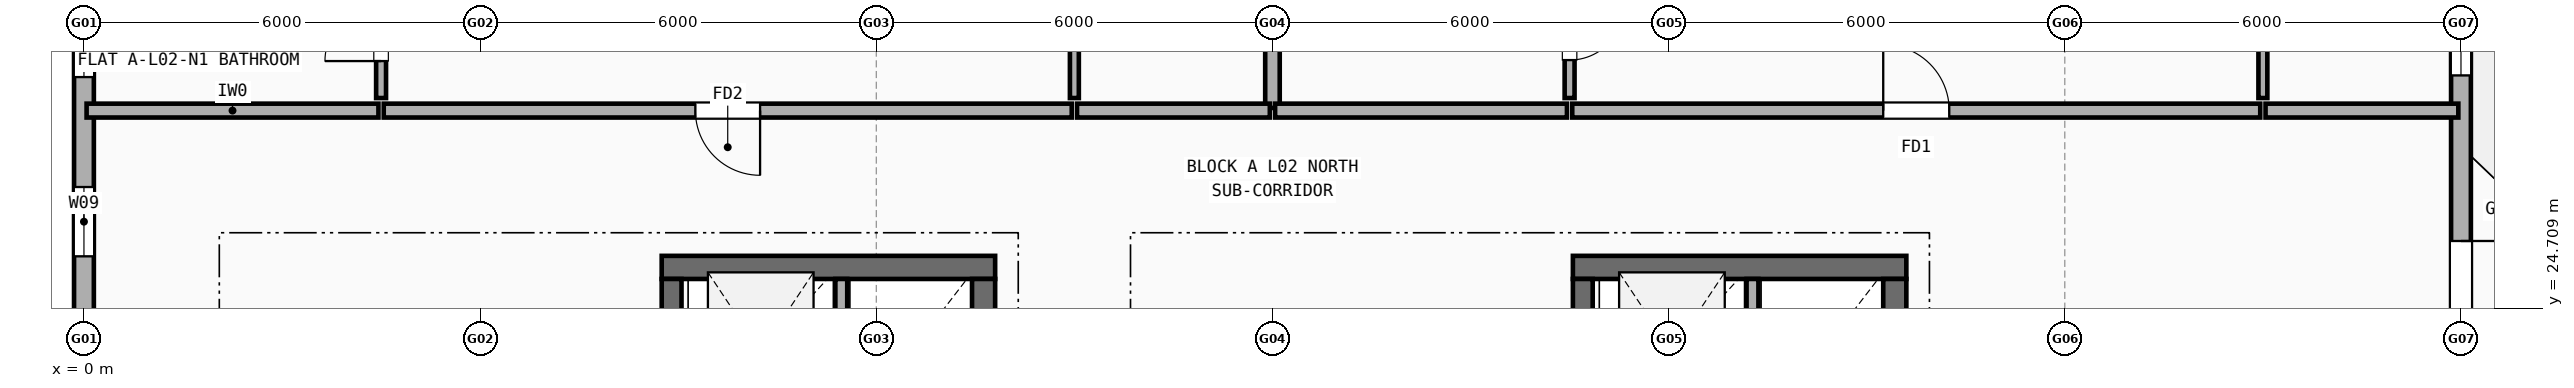
"""IFC4 building model, lengths in metres.
Left out: names, types, materials, properties, quantities, classifications, styles, units other than length and angle.
Written with IfcOpenShell. Run it as: python <this file> out.ifc"""

import sys

from ifc_helpers import new_model, si_unit, direction, frame, frame_2d, origin, place, context, subcontext, project, spatial, rectangle, extrude, element, fill, save


model = new_model("IFC4")
c1 = context("Model", 3, precision=1e-05, world=origin(), true_north=direction((0.0, 1.0)))
c2 = subcontext(c1, "Body", "Model", "MODEL_VIEW")
j1 = project(units=[si_unit("LENGTHUNIT", "METRE"), si_unit("PLANEANGLEUNIT", "RADIAN")], contexts=[c1])
p1 = place(None, origin())
s1 = spatial("IfcSite", under=j1, at=p1, CompositionType="ELEMENT")
p2 = place(p1, origin())
s2 = spatial("IfcBuilding", under=s1, at=p2, CompositionType="ELEMENT")
p3 = place(p2, frame((0.0, 0.0, 7.7)))
s3 = spatial("IfcBuildingStorey", under=s2, at=p3, CompositionType="ELEMENT", Elevation=7.7)
p4 = place(p3, frame((36.0, 24.375, 0.0), z_axis=(0.0, 0.0, 1.0), x_axis=(0.0, 1.0, 0.0)))
e1 = element("IfcWall", 1, at=p4, inside=s3, PredefinedType="STANDARD", context=c2, shape_type="SweptSolid", body=[
    extrude(rectangle(XDim=5.25, YDim=0.3, at=frame_2d((2.625, 0.0))), origin(), (0.0, 0.0, 1.0), 2.437),
])
p5 = place(p4, frame((0.2, 0.0, 0.0)))
e2 = element("IfcOpeningElement", 2, at=p5, cuts=e1, PredefinedType="OPENING", context=c2, shape_type="SweptSolid", body=[
    extrude(rectangle(XDim=1.15, YDim=2.15, at=frame_2d((0.575, 1.075))), frame((0.0, 0.16, 0.0), z_axis=(0.0, -1.0, 0.0), x_axis=(1.0, 0.0, 0.0)), (0.0, 0.0, 1.0), 0.32),
])
p6 = place(p4, frame((3.857, 0.0, 0.9)))
e3 = element("IfcOpeningElement", 3, at=p6, cuts=e1, PredefinedType="OPENING", context=c2, shape_type="SweptSolid", body=[
    extrude(rectangle(XDim=0.9, YDim=1.3, at=frame_2d((0.45, 0.65))), frame((0.0, 0.16, 0.0), z_axis=(0.0, -1.0, 0.0), x_axis=(1.0, 0.0, 0.0)), (0.0, 0.0, 1.0), 0.32),
])
p7 = place(p3, frame((0.0, 29.625, 0.0), z_axis=(0.0, 0.0, 1.0), x_axis=(0.0, -1.0, 0.0)))
e4 = element("IfcWall", 4, at=p7, inside=s3, PredefinedType="STANDARD", context=c2, shape_type="SweptSolid", body=[
    extrude(rectangle(XDim=5.25, YDim=0.3, at=frame_2d((2.625, 0.0))), origin(), (0.0, 0.0, 1.0), 2.437),
])
p8 = place(p7, frame((0.468, 0.0, 0.9)))
e5 = element("IfcOpeningElement", 5, at=p8, cuts=e4, PredefinedType="OPENING", context=c2, shape_type="SweptSolid", body=[
    extrude(rectangle(XDim=0.95, YDim=1.35, at=frame_2d((0.475, 0.675))), frame((0.0, 0.16, 0.0), z_axis=(0.0, -1.0, 0.0), x_axis=(1.0, 0.0, 0.0)), (0.0, 0.0, 1.0), 0.32),
])
p9 = place(p7, frame((3.083, 0.0, 0.9)))
e6 = element("IfcOpeningElement", 6, at=p9, cuts=e4, PredefinedType="OPENING", context=c2, shape_type="SweptSolid", body=[
    extrude(rectangle(XDim=1.05, YDim=1.35, at=frame_2d((0.525, 0.675))), frame((0.0, 0.16, 0.0), z_axis=(0.0, -1.0, 0.0), x_axis=(1.0, 0.0, 0.0)), (0.0, 0.0, 1.0), 0.32),
])
p10 = place(p3, frame((13.8, 25.325, 0.0), z_axis=(0.0, 0.0, 1.0), x_axis=(-1.0, 0.0, 0.0)))
e7 = element("IfcWall", 7, at=p10, inside=s3, PredefinedType="SHEAR", context=c2, shape_type="SweptSolid", body=[
    extrude(rectangle(XDim=5.05, YDim=0.35, at=frame_2d((2.525, 0.0))), origin(), (0.0, 0.0, 1.0), 2.955),
])
p11 = place(p3, frame((13.625, 18.75, 0.0), z_axis=(0.0, 0.0, 1.0), x_axis=(0.0, 1.0, 0.0)))
e8 = element("IfcWall", 8, at=p11, inside=s3, PredefinedType="SHEAR", context=c2, shape_type="SweptSolid", body=[
    extrude(rectangle(XDim=6.4, YDim=0.35, at=frame_2d((3.2, 0.0))), origin(), (0.0, 0.0, 1.0), 2.955),
])
p12 = place(p3, frame((8.9, 21.8, 0.0), z_axis=(0.0, 0.0, 1.0), x_axis=(0.0, 1.0, 0.0)))
e9 = element("IfcWall", 9, at=p12, inside=s3, PredefinedType="SHEAR", context=c2, shape_type="SweptSolid", body=[
    extrude(rectangle(XDim=3.35, YDim=0.3, at=frame_2d((1.675, 0.0))), origin(), (0.0, 0.0, 1.0), 2.955),
])
p13 = place(p3, frame((11.47, 22.94, 0.0), z_axis=(0.0, 0.0, 1.0), x_axis=(0.0, 1.0, 0.0)))
e10 = element("IfcWall", 10, at=p13, inside=s3, PredefinedType="SOLIDWALL", context=c2, shape_type="SweptSolid", body=[
    extrude(rectangle(XDim=2.21, YDim=0.18, at=frame_2d((1.105, 0.0))), origin(), (0.0, 0.0, 1.0), 2.955),
])
p14 = place(p3, frame((27.6, 25.325, 0.0), z_axis=(0.0, 0.0, 1.0), x_axis=(-1.0, 0.0, 0.0)))
e11 = element("IfcWall", 11, at=p14, inside=s3, PredefinedType="SHEAR", context=c2, shape_type="SweptSolid", body=[
    extrude(rectangle(XDim=5.05, YDim=0.35, at=frame_2d((2.525, 0.0))), origin(), (0.0, 0.0, 1.0), 2.955),
])
p15 = place(p3, frame((27.425, 18.75, 0.0), z_axis=(0.0, 0.0, 1.0), x_axis=(0.0, 1.0, 0.0)))
e12 = element("IfcWall", 12, at=p15, inside=s3, PredefinedType="SHEAR", context=c2, shape_type="SweptSolid", body=[
    extrude(rectangle(XDim=6.4, YDim=0.35, at=frame_2d((3.2, 0.0))), origin(), (0.0, 0.0, 1.0), 2.955),
])
p16 = place(p3, frame((22.7, 21.8, 0.0), z_axis=(0.0, 0.0, 1.0), x_axis=(0.0, 1.0, 0.0)))
e13 = element("IfcWall", 13, at=p16, inside=s3, PredefinedType="SHEAR", context=c2, shape_type="SweptSolid", body=[
    extrude(rectangle(XDim=3.35, YDim=0.3, at=frame_2d((1.675, 0.0))), origin(), (0.0, 0.0, 1.0), 2.955),
])
p17 = place(p3, frame((25.27, 22.94, 0.0), z_axis=(0.0, 0.0, 1.0), x_axis=(0.0, 1.0, 0.0)))
e14 = element("IfcWall", 14, at=p17, inside=s3, PredefinedType="SOLIDWALL", context=c2, shape_type="SweptSolid", body=[
    extrude(rectangle(XDim=2.21, YDim=0.18, at=frame_2d((1.105, 0.0))), origin(), (0.0, 0.0, 1.0), 2.955),
])
p18 = place(p3, frame((18.0, 27.74, 0.0), z_axis=(0.0, 0.0, 1.0), x_axis=(0.0, 1.0, 0.0)))
e15 = element("IfcWall", 15, at=p18, inside=s3, PredefinedType="SOLIDWALL", context=c2, shape_type="SweptSolid", body=[
    extrude(rectangle(XDim=13.87, YDim=0.22, at=frame_2d((6.935, 0.0))), origin(), (0.0, 0.0, 1.0), 2.337),
])
p19 = place(p3, frame((0.04, 27.7, 0.0), z_axis=(0.0, 0.0, 1.0), x_axis=(1.0, 0.0, 0.0)))
e16 = element("IfcWall", 16, at=p19, inside=s3, PredefinedType="SOLIDWALL", context=c2, shape_type="SweptSolid", body=[
    extrude(rectangle(XDim=4.42, YDim=0.21, at=frame_2d((2.21, 0.0))), origin(), (0.0, 0.0, 1.0), 2.437),
])
p20 = place(p3, frame((4.54, 27.7, 0.0), z_axis=(0.0, 0.0, 1.0), x_axis=(1.0, 0.0, 0.0)))
e17 = element("IfcWall", 17, at=p20, inside=s3, PredefinedType="SOLIDWALL", context=c2, shape_type="SweptSolid", body=[
    extrude(rectangle(XDim=10.42, YDim=0.21, at=frame_2d((5.21, 0.0))), origin(), (0.0, 0.0, 1.0), 2.508),
])
p21 = place(p20, frame((4.72, 0.0, 0.0)))
e18 = element("IfcOpeningElement", 18, at=p21, cuts=e17, PredefinedType="OPENING", context=c2, shape_type="SweptSolid", body=[
    extrude(rectangle(XDim=0.98, YDim=2.15, at=frame_2d((0.49, 1.075))), frame((0.0, 0.115, 0.0), z_axis=(0.0, -1.0, 0.0), x_axis=(1.0, 0.0, 0.0)), (0.0, 0.0, 1.0), 0.23),
])
p22 = place(p3, frame((4.5, 27.89, 0.0), z_axis=(0.0, 0.0, 1.0), x_axis=(0.0, 1.0, 0.0)))
e19 = element("IfcWall", 19, at=p22, inside=s3, PredefinedType="PARTITIONING", context=c2, shape_type="SweptSolid", body=[
    extrude(rectangle(XDim=1.97, YDim=0.15, at=frame_2d((0.985, 0.0))), origin(), (0.0, 0.0, 1.0), 2.955),
])
p23 = place(p22, frame((0.56, 0.0, 0.0)))
e20 = element("IfcOpeningElement", 20, at=p23, cuts=e19, PredefinedType="OPENING", context=c2, shape_type="SweptSolid", body=[
    extrude(rectangle(XDim=0.85, YDim=2.1, at=frame_2d((0.425, 1.05))), frame((0.0, 0.085, 0.0), z_axis=(0.0, -1.0, 0.0), x_axis=(1.0, 0.0, 0.0)), (0.0, 0.0, 1.0), 0.17),
])
p24 = place(p3, frame((15.04, 27.7, 0.0), z_axis=(0.0, 0.0, 1.0), x_axis=(1.0, 0.0, 0.0)))
e21 = element("IfcWall", 21, at=p24, inside=s3, PredefinedType="SOLIDWALL", context=c2, shape_type="SweptSolid", body=[
    extrude(rectangle(XDim=2.92, YDim=0.21, at=frame_2d((1.46, 0.0))), origin(), (0.0, 0.0, 1.0), 2.955),
])
p25 = place(p3, frame((15.0, 27.89, 0.0), z_axis=(0.0, 0.0, 1.0), x_axis=(0.0, 1.0, 0.0)))
e22 = element("IfcWall", 22, at=p25, inside=s3, PredefinedType="PARTITIONING", context=c2, shape_type="SweptSolid", body=[
    extrude(rectangle(XDim=13.92, YDim=0.135, at=frame_2d((6.96, 0.0))), origin(), (0.0, 0.0, 1.0), 2.437),
])
p26 = place(p25, frame((6.65, 0.0, 0.0)))
e23 = element("IfcOpeningElement", 23, at=p26, cuts=e22, PredefinedType="OPENING", context=c2, shape_type="SweptSolid", body=[
    extrude(rectangle(XDim=0.9, YDim=2.1, at=frame_2d((0.45, 1.05))), frame((0.0, 0.077, 0.0), z_axis=(0.0, -1.0, 0.0), x_axis=(1.0, 0.0, 0.0)), (0.0, 0.0, 1.0), 0.155),
])
p27 = place(p3, frame((18.04, 27.7, 0.0), z_axis=(0.0, 0.0, 1.0), x_axis=(1.0, 0.0, 0.0)))
e24 = element("IfcWall", 24, at=p27, inside=s3, PredefinedType="SOLIDWALL", context=c2, shape_type="SweptSolid", body=[
    extrude(rectangle(XDim=4.42, YDim=0.21, at=frame_2d((2.21, 0.0))), origin(), (0.0, 0.0, 1.0), 2.955),
])
p28 = place(p3, frame((22.54, 27.7, 0.0), z_axis=(0.0, 0.0, 1.0), x_axis=(1.0, 0.0, 0.0)))
e25 = element("IfcWall", 25, at=p28, inside=s3, PredefinedType="SOLIDWALL", context=c2, shape_type="SweptSolid", body=[
    extrude(rectangle(XDim=10.42, YDim=0.21, at=frame_2d((5.21, 0.0))), origin(), (0.0, 0.0, 1.0), 2.437),
])
p29 = place(p28, frame((4.71, 0.0, 0.0)))
e26 = element("IfcOpeningElement", 26, at=p29, cuts=e25, PredefinedType="OPENING", context=c2, shape_type="SweptSolid", body=[
    extrude(rectangle(XDim=1.0, YDim=2.15, at=frame_2d((0.5, 1.075))), frame((0.0, 0.115, 0.0), z_axis=(0.0, -1.0, 0.0), x_axis=(1.0, 0.0, 0.0)), (0.0, 0.0, 1.0), 0.23),
])
p30 = place(p3, frame((22.5, 27.89, 0.0), z_axis=(0.0, 0.0, 1.0), x_axis=(0.0, 1.0, 0.0)))
e27 = element("IfcWall", 27, at=p30, inside=s3, PredefinedType="PARTITIONING", context=c2, shape_type="SweptSolid", body=[
    extrude(rectangle(XDim=1.97, YDim=0.15, at=frame_2d((0.985, 0.0))), origin(), (0.0, 0.0, 1.0), 2.955),
])
p31 = place(p30, frame((0.575, 0.0, 0.0)))
e28 = element("IfcOpeningElement", 28, at=p31, cuts=e27, PredefinedType="OPENING", context=c2, shape_type="SweptSolid", body=[
    extrude(rectangle(XDim=0.82, YDim=2.08, at=frame_2d((0.41, 1.04))), frame((0.0, 0.085, 0.0), z_axis=(0.0, -1.0, 0.0), x_axis=(1.0, 0.0, 0.0)), (0.0, 0.0, 1.0), 0.17),
])
p32 = place(p3, frame((33.04, 27.7, 0.0), z_axis=(0.0, 0.0, 1.0), x_axis=(1.0, 0.0, 0.0)))
e29 = element("IfcWall", 29, at=p32, inside=s3, PredefinedType="SOLIDWALL", context=c2, shape_type="SweptSolid", body=[
    extrude(rectangle(XDim=2.92, YDim=0.21, at=frame_2d((1.46, 0.0))), origin(), (0.0, 0.0, 1.0), 2.437),
])
p33 = place(p3, frame((33.0, 27.89, 0.0), z_axis=(0.0, 0.0, 1.0), x_axis=(0.0, 1.0, 0.0)))
e30 = element("IfcWall", 30, at=p33, inside=s3, PredefinedType="PARTITIONING", context=c2, shape_type="SweptSolid", body=[
    extrude(rectangle(XDim=13.92, YDim=0.135, at=frame_2d((6.96, 0.0))), origin(), (0.0, 0.0, 1.0), 2.437),
])
p34 = place(p33, frame((6.65, 0.0, 0.0)))
e31 = element("IfcOpeningElement", 31, at=p34, cuts=e30, PredefinedType="OPENING", context=c2, shape_type="SweptSolid", body=[
    extrude(rectangle(XDim=0.88, YDim=2.1, at=frame_2d((0.44, 1.05))), frame((0.0, 0.077, 0.0), z_axis=(0.0, -1.0, 0.0), x_axis=(1.0, 0.0, 0.0)), (0.0, 0.0, 1.0), 0.155),
])
p35 = place(p5, frame((1.15, 0.0, 0.0), z_axis=(0.0, 0.0, 1.0), x_axis=(-1.0, 0.0, 0.0)))
e32 = element("IfcDoor", 32, at=p35, inside=s3, OperationType="SINGLE_SWING_RIGHT", PredefinedType="DOOR", context=c2, shape_type="SweptSolid", body=[
    extrude(rectangle(XDim=1.15, YDim=2.15, at=frame_2d((0.575, 1.075))), frame((0.0, 0.025, 0.0), z_axis=(0.0, -1.0, 0.0), x_axis=(1.0, 0.0, 0.0)), (0.0, 0.0, 1.0), 0.05),
])
fill(e2, e32)
p36 = place(p6, origin())
e33 = element("IfcWindow", 33, at=p36, inside=s3, PartitioningType="SINGLE_PANEL", PredefinedType="WINDOW", context=c2, shape_type="SweptSolid", body=[
    extrude(rectangle(XDim=0.9, YDim=1.3, at=frame_2d((0.45, 0.65))), frame((0.0, 0.03, 0.0), z_axis=(0.0, -1.0, 0.0), x_axis=(1.0, 0.0, 0.0)), (0.0, 0.0, 1.0), 0.06),
])
fill(e3, e33)
p37 = place(p8, origin())
e34 = element("IfcWindow", 34, at=p37, inside=s3, PartitioningType="SINGLE_PANEL", PredefinedType="WINDOW", context=c2, shape_type="SweptSolid", body=[
    extrude(rectangle(XDim=0.95, YDim=1.35, at=frame_2d((0.475, 0.675))), frame((0.0, 0.03, 0.0), z_axis=(0.0, -1.0, 0.0), x_axis=(1.0, 0.0, 0.0)), (0.0, 0.0, 1.0), 0.06),
])
fill(e5, e34)
p38 = place(p9, origin())
e35 = element("IfcWindow", 35, at=p38, inside=s3, PartitioningType="SINGLE_PANEL", PredefinedType="WINDOW", context=c2, shape_type="SweptSolid", body=[
    extrude(rectangle(XDim=1.05, YDim=1.35, at=frame_2d((0.525, 0.675))), frame((0.0, 0.03, 0.0), z_axis=(0.0, -1.0, 0.0), x_axis=(1.0, 0.0, 0.0)), (0.0, 0.0, 1.0), 0.06),
])
fill(e6, e35)
p39 = place(p21, origin())
e36 = element("IfcDoor", 36, at=p39, inside=s3, OperationType="SINGLE_SWING_RIGHT", PredefinedType="DOOR", context=c2, shape_type="SweptSolid", body=[
    extrude(rectangle(XDim=0.98, YDim=2.15, at=frame_2d((0.49, 1.075))), frame((0.0, 0.025, 0.0), z_axis=(0.0, -1.0, 0.0), x_axis=(1.0, 0.0, 0.0)), (0.0, 0.0, 1.0), 0.05),
])
fill(e18, e36)
p40 = place(p23, origin())
e37 = element("IfcDoor", 37, at=p40, inside=s3, OperationType="SINGLE_SWING_LEFT", PredefinedType="DOOR", context=c2, shape_type="SweptSolid", body=[
    extrude(rectangle(XDim=0.85, YDim=2.1, at=frame_2d((0.425, 1.05))), frame((0.0, 0.025, 0.0), z_axis=(0.0, -1.0, 0.0), x_axis=(1.0, 0.0, 0.0)), (0.0, 0.0, 1.0), 0.05),
])
fill(e20, e37)
p41 = place(p29, origin())
e38 = element("IfcDoor", 38, at=p41, inside=s3, OperationType="SINGLE_SWING_LEFT", PredefinedType="DOOR", context=c2, shape_type="SweptSolid", body=[
    extrude(rectangle(XDim=1.0, YDim=2.15, at=frame_2d((0.5, 1.075))), frame((0.0, 0.025, 0.0), z_axis=(0.0, -1.0, 0.0), x_axis=(1.0, 0.0, 0.0)), (0.0, 0.0, 1.0), 0.05),
])
fill(e26, e38)
p42 = place(p31, origin())
e39 = element("IfcDoor", 39, at=p42, inside=s3, OperationType="SINGLE_SWING_RIGHT", PredefinedType="DOOR", context=c2, shape_type="SweptSolid", body=[
    extrude(rectangle(XDim=0.82, YDim=2.08, at=frame_2d((0.41, 1.04))), frame((0.0, 0.025, 0.0), z_axis=(0.0, -1.0, 0.0), x_axis=(1.0, 0.0, 0.0)), (0.0, 0.0, 1.0), 0.05),
])
fill(e28, e39)
save(model, sys.argv[1])
